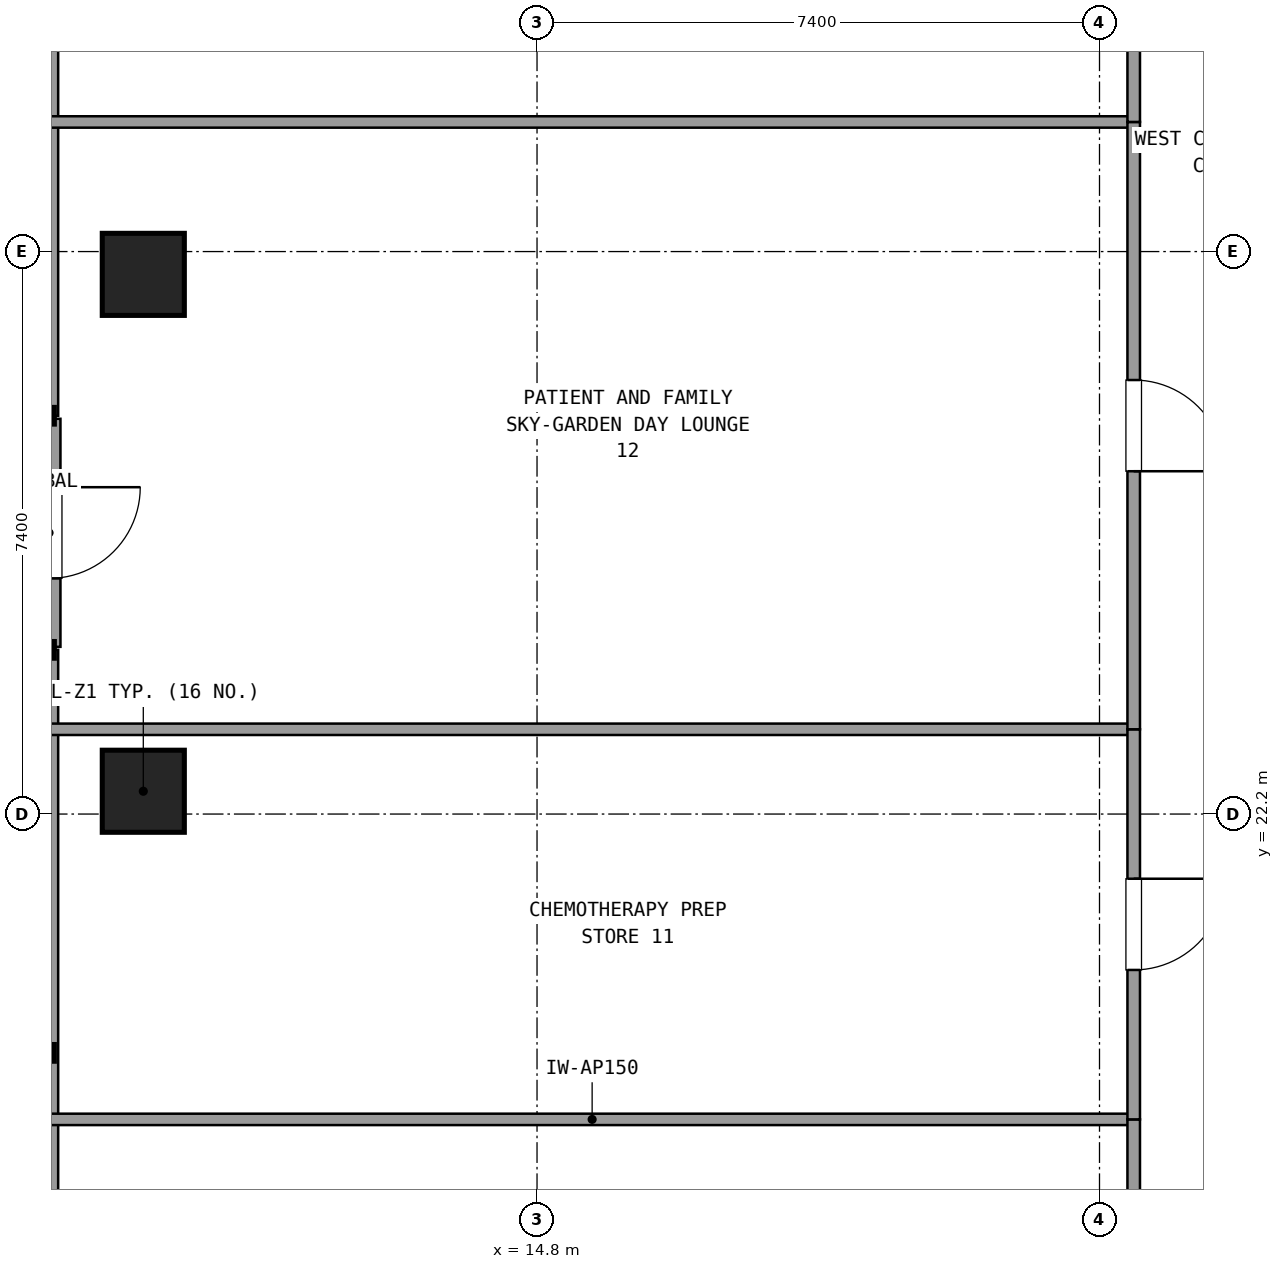
"""IFC4 building model, lengths in metres.
Left out: names, types, materials, properties, quantities, classifications, styles, units other than length and angle.
Written with IfcOpenShell. Run it as: python <this file> out.ifc"""

import sys

from ifc_helpers import new_model, si_unit, direction, frame, frame_2d, origin, origin_2d, place, context, subcontext, project, spatial, rectangle, extrude, element, fill, save


model = new_model("IFC4")
c1 = context("Model", 3, precision=1e-05, world=origin(), true_north=direction((0.0, 1.0)))
c2 = subcontext(c1, "Body", "Model", "MODEL_VIEW")
j1 = project(units=[si_unit("LENGTHUNIT", "METRE"), si_unit("PLANEANGLEUNIT", "RADIAN")], contexts=[c1])
p1 = place(None, origin())
s1 = spatial("IfcSite", under=j1, at=p1, CompositionType="ELEMENT")
p2 = place(p1, origin())
s2 = spatial("IfcBuilding", under=s1, at=p2, CompositionType="ELEMENT")
p3 = place(p2, frame((0.0, 0.0, 56.34)))
s3 = spatial("IfcBuildingStorey", under=s2, at=p3, CompositionType="ELEMENT", Elevation=56.34)
for number, where, z_axis, x_axis in (
    (1, (9.62, 22.5, 0.0), (0.0, 0.0, 1.0), (1.0, 0.0, 0.0)),
    (2, (9.62, 29.3, 0.0), (0.0, 0.0, 1.0), (1.0, 0.0, 0.0)),
):
    element("IfcColumn", number, at=place(p3, frame(where, z_axis=z_axis, x_axis=x_axis)), inside=s3, PredefinedType="COLUMN", context=c2, shape_type="SweptSolid", body=[
        extrude(rectangle(XDim=1.08, YDim=1.08, at=origin_2d()), origin(), (0.0, 0.0, 1.0), 3.6),
    ])
p4 = place(p3, frame((8.38, 27.4, 0.0), z_axis=(0.0, 0.0, 1.0), x_axis=(0.0, -1.0, 0.0)))
e3 = element("IfcWall", 3, at=p4, inside=s3, PredefinedType="SOLIDWALL", context=c2, shape_type="SweptSolid", body=[
    extrude(rectangle(XDim=3.0, YDim=0.3, at=frame_2d((1.5, 0.0))), origin(), (0.0, 0.0, 1.0), 2.65),
])
p5 = place(p4, frame((0.9, 0.0, 0.0)))
e4 = element("IfcOpeningElement", 4, at=p5, cuts=e3, PredefinedType="OPENING", context=c2, shape_type="SweptSolid", body=[
    extrude(rectangle(XDim=1.2, YDim=2.2, at=frame_2d((0.6, 1.1))), frame((0.0, 0.16, 0.0), z_axis=(0.0, -1.0, 0.0), x_axis=(1.0, 0.0, 0.0)), (0.0, 0.0, 1.0), 0.32),
])
for number, where, z_axis, x_axis in (
    (5, (8.38, 43.345, 0.0), (0.0, 0.0, 1.0), (0.0, -1.0, 0.0)),
    (6, (8.38, 24.36, 0.0), (0.0, 0.0, 1.0), (0.0, -1.0, 0.0)),
):
    element("IfcWall", number, at=place(p3, frame(where, z_axis=z_axis, x_axis=x_axis)), inside=s3, PredefinedType="SOLIDWALL", context=c2, shape_type="SweptSolid", body=[
        extrude(rectangle(XDim=15.905, YDim=0.24, at=frame_2d((7.953, 0.0))), origin(), (0.0, 0.0, 1.0), 0.85),
    ])
p6 = place(p3, frame((22.65, 18.183, 0.0), z_axis=(0.0, 0.0, 1.0), x_axis=(-1.0, 0.0, 0.0)))
e7 = element("IfcWall", 7, at=p6, inside=s3, PredefinedType="PARTITIONING", context=c2, shape_type="SweptSolid", body=[
    extrude(rectangle(XDim=14.25, YDim=0.15, at=frame_2d((7.125, 0.0))), origin(), (0.0, 0.0, 1.0), 2.61),
])
p7 = place(p3, frame((22.65, 14.15, 0.0), z_axis=(0.0, 0.0, 1.0), x_axis=(0.0, 1.0, 0.0)))
e8 = element("IfcWall", 8, at=p7, inside=s3, PredefinedType="PARTITIONING", context=c2, shape_type="SweptSolid", body=[
    extrude(rectangle(XDim=4.033, YDim=0.165, at=frame_2d((2.017, 0.0))), origin(), (0.0, 0.0, 1.0), 2.61),
])
p8 = place(p7, frame((1.416, 0.0, 0.0)))
e9 = element("IfcOpeningElement", 9, at=p8, cuts=e8, PredefinedType="OPENING", context=c2, shape_type="SweptSolid", body=[
    extrude(rectangle(XDim=1.2, YDim=2.15, at=frame_2d((0.6, 1.075))), frame((0.0, 0.093, 0.0), z_axis=(0.0, -1.0, 0.0), x_axis=(1.0, 0.0, 0.0)), (0.0, 0.0, 1.0), 0.185),
])
p9 = place(p3, frame((22.65, 23.315, 0.0), z_axis=(0.0, 0.0, 1.0), x_axis=(-1.0, 0.0, 0.0)))
e10 = element("IfcWall", 10, at=p9, inside=s3, PredefinedType="PARTITIONING", context=c2, shape_type="SweptSolid", body=[
    extrude(rectangle(XDim=14.25, YDim=0.15, at=frame_2d((7.125, 0.0))), origin(), (0.0, 0.0, 1.0), 2.61),
])
p10 = place(p3, frame((22.65, 18.183, 0.0), z_axis=(0.0, 0.0, 1.0), x_axis=(0.0, 1.0, 0.0)))
e11 = element("IfcWall", 11, at=p10, inside=s3, PredefinedType="PARTITIONING", context=c2, shape_type="SweptSolid", body=[
    extrude(rectangle(XDim=5.132, YDim=0.165, at=frame_2d((2.566, 0.0))), origin(), (0.0, 0.0, 1.0), 2.61),
])
p11 = place(p10, frame((1.966, 0.0, 0.0)))
e12 = element("IfcOpeningElement", 12, at=p11, cuts=e11, PredefinedType="OPENING", context=c2, shape_type="SweptSolid", body=[
    extrude(rectangle(XDim=1.2, YDim=2.15, at=frame_2d((0.6, 1.075))), frame((0.0, 0.093, 0.0), z_axis=(0.0, -1.0, 0.0), x_axis=(1.0, 0.0, 0.0)), (0.0, 0.0, 1.0), 0.185),
])
p12 = place(p3, frame((22.65, 31.305, 0.0), z_axis=(0.0, 0.0, 1.0), x_axis=(-1.0, 0.0, 0.0)))
e13 = element("IfcWall", 13, at=p12, inside=s3, PredefinedType="PARTITIONING", context=c2, shape_type="SweptSolid", body=[
    extrude(rectangle(XDim=14.25, YDim=0.15, at=frame_2d((7.125, 0.0))), origin(), (0.0, 0.0, 1.0), 2.61),
])
p13 = place(p3, frame((22.65, 23.315, 0.0), z_axis=(0.0, 0.0, 1.0), x_axis=(0.0, 1.0, 0.0)))
e14 = element("IfcWall", 14, at=p13, inside=s3, PredefinedType="PARTITIONING", context=c2, shape_type="SweptSolid", body=[
    extrude(rectangle(XDim=7.99, YDim=0.165, at=frame_2d((3.995, 0.0))), origin(), (0.0, 0.0, 1.0), 2.61),
])
p14 = place(p13, frame((3.395, 0.0, 0.0)))
e15 = element("IfcOpeningElement", 15, at=p14, cuts=e14, PredefinedType="OPENING", context=c2, shape_type="SweptSolid", body=[
    extrude(rectangle(XDim=1.2, YDim=2.15, at=frame_2d((0.6, 1.075))), frame((0.0, 0.093, 0.0), z_axis=(0.0, -1.0, 0.0), x_axis=(1.0, 0.0, 0.0)), (0.0, 0.0, 1.0), 0.185),
])
p15 = place(p3, frame((22.65, 31.305, 0.0), z_axis=(0.0, 0.0, 1.0), x_axis=(0.0, 1.0, 0.0)))
e16 = element("IfcWall", 16, at=p15, inside=s3, PredefinedType="PARTITIONING", context=c2, shape_type="SweptSolid", body=[
    extrude(rectangle(XDim=6.345, YDim=0.165, at=frame_2d((3.172, 0.0))), origin(), (0.0, 0.0, 1.0), 2.61),
])
p16 = place(p15, frame((2.572, 0.0, 0.0)))
e17 = element("IfcOpeningElement", 17, at=p16, cuts=e16, PredefinedType="OPENING", context=c2, shape_type="SweptSolid", body=[
    extrude(rectangle(XDim=1.2, YDim=2.15, at=frame_2d((0.6, 1.075))), frame((0.0, 0.093, 0.0), z_axis=(0.0, -1.0, 0.0), x_axis=(1.0, 0.0, 0.0)), (0.0, 0.0, 1.0), 0.185),
])
p17 = place(p11, frame((1.2, 0.0, 0.0), z_axis=(0.0, 0.0, 1.0), x_axis=(-1.0, 0.0, 0.0)))
e18 = element("IfcDoor", 18, at=p17, inside=s3, OperationType="SINGLE_SWING_RIGHT", PredefinedType="DOOR", context=c2, shape_type="SweptSolid", body=[
    extrude(rectangle(XDim=1.2, YDim=2.15, at=frame_2d((0.6, 1.075))), frame((0.0, 0.025, 0.0), z_axis=(0.0, -1.0, 0.0), x_axis=(1.0, 0.0, 0.0)), (0.0, 0.0, 1.0), 0.05),
])
fill(e12, e18)
p18 = place(p14, frame((1.2, 0.0, 0.0), z_axis=(0.0, 0.0, 1.0), x_axis=(-1.0, 0.0, 0.0)))
e19 = element("IfcDoor", 19, at=p18, inside=s3, OperationType="SINGLE_SWING_LEFT", PredefinedType="DOOR", context=c2, shape_type="SweptSolid", body=[
    extrude(rectangle(XDim=1.2, YDim=2.15, at=frame_2d((0.6, 1.075))), frame((0.0, 0.025, 0.0), z_axis=(0.0, -1.0, 0.0), x_axis=(1.0, 0.0, 0.0)), (0.0, 0.0, 1.0), 0.05),
])
fill(e15, e19)
save(model, sys.argv[1])
